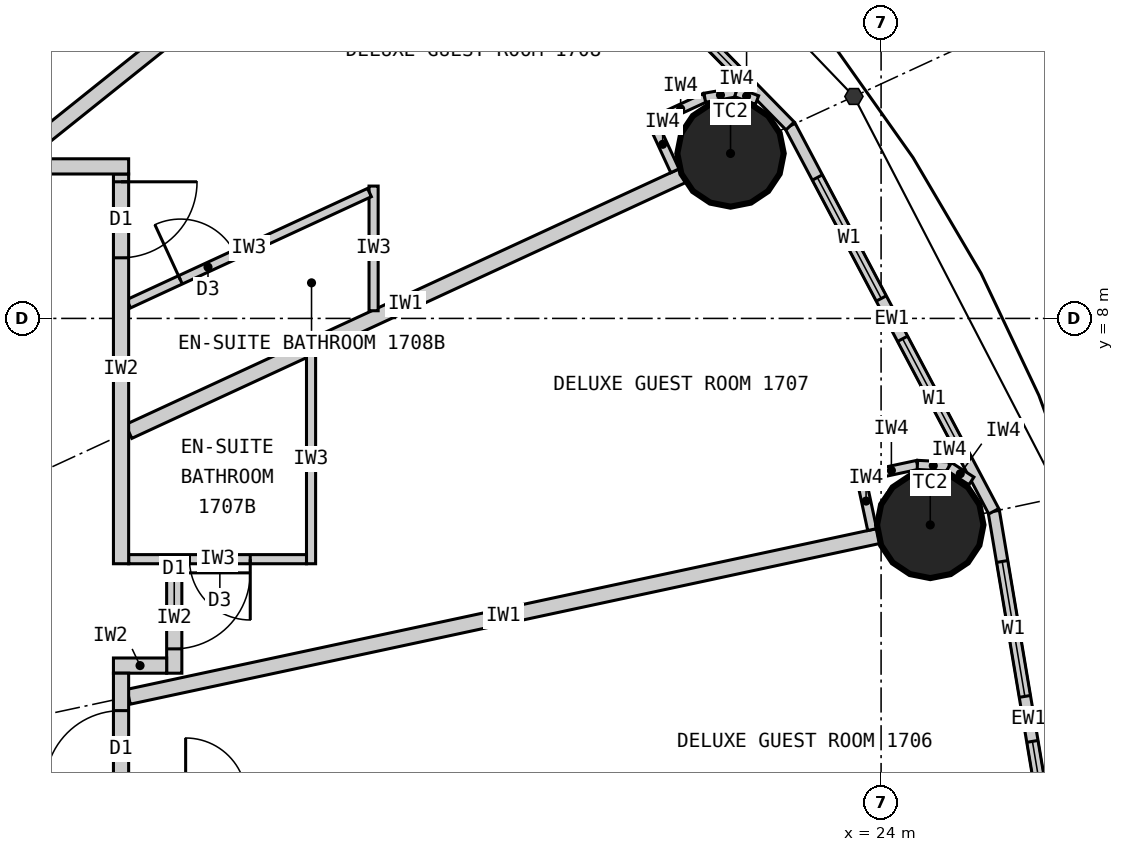
"""IFC4 building model, lengths in metres.
Left out: names, types, materials, properties, quantities, classifications, styles, units other than length and angle.
Written with IfcOpenShell. Run it as: python <this file> out.ifc"""

import sys

from ifc_helpers import new_model, si_unit, direction, frame, frame_2d, origin, origin_2d, place, context, subcontext, project, spatial, rectangle, circle, extrude, element, fill, save


model = new_model("IFC4")
c1 = context("Model", 3, precision=1e-05, world=origin(), true_north=direction((0.0, 1.0)))
c2 = subcontext(c1, "Body", "Model", "MODEL_VIEW")
j1 = project(units=[si_unit("LENGTHUNIT", "METRE"), si_unit("PLANEANGLEUNIT", "RADIAN")], contexts=[c1])
p1 = place(None, origin())
s1 = spatial("IfcSite", under=j1, at=p1, CompositionType="ELEMENT")
p2 = place(p1, origin())
s2 = spatial("IfcBuilding", under=s1, at=p2, CompositionType="ELEMENT")
p3 = place(p2, frame((0.0, 0.0, 70.5)))
s3 = spatial("IfcBuildingStorey", under=s2, at=p3, CompositionType="ELEMENT", Elevation=70.5)
for number, where, z_axis, x_axis in (
    (1, (24.647, 5.283, 0.0), (0.0, 0.0, 1.0), (1.0, 0.0, 0.0)),
    (2, (22.019, 10.17, 0.0), (0.0, 0.0, 1.0), (1.0, 0.0, 0.0)),
):
    element("IfcColumn", number, at=place(p3, frame(where, z_axis=z_axis, x_axis=x_axis)), inside=s3, PredefinedType="COLUMN", context=c2, shape_type="SweptSolid", body=[
        extrude(circle(Radius=0.7, at=origin_2d()), origin(), (0.0, 0.0, 1.0), 3.3),
    ])
p4 = place(p3, frame((26.4, 0.0, 0.0), z_axis=(0.0, 0.0, 1.0), x_axis=(-0.165642551694, 0.986185857264, 0.0)))
e3 = element("IfcWall", 3, at=p4, inside=s3, PredefinedType="ELEMENTEDWALL", context=c2, shape_type="SweptSolid", body=[
    extrude(rectangle(XDim=5.539, YDim=0.15, at=frame_2d((2.77, 0.0))), origin(), (0.0, 0.0, 1.0), 3.12),
])
p5 = place(p4, frame((0.669, 0.0, 0.9)))
e4 = element("IfcOpeningElement", 4, at=p5, cuts=e3, PredefinedType="OPENING", context=c2, shape_type="SweptSolid", body=[
    extrude(rectangle(XDim=1.8, YDim=1.9, at=frame_2d((0.9, 0.95))), frame((0.0, 0.085, 0.0), z_axis=(0.0, -1.0, 0.0), x_axis=(1.0, 0.0, 0.0)), (0.0, 0.0, 1.0), 0.17),
])
p6 = place(p4, frame((3.07, 0.0, 0.9)))
e5 = element("IfcOpeningElement", 5, at=p6, cuts=e3, PredefinedType="OPENING", context=c2, shape_type="SweptSolid", body=[
    extrude(rectangle(XDim=1.8, YDim=1.9, at=frame_2d((0.9, 0.95))), frame((0.0, 0.085, 0.0), z_axis=(0.0, -1.0, 0.0), x_axis=(1.0, 0.0, 0.0)), (0.0, 0.0, 1.0), 0.17),
])
p7 = place(p3, frame((25.482, 5.462, 0.0), z_axis=(0.0, 0.0, 1.0), x_axis=(-0.467296867008, 0.884100468321, 0.0)))
e6 = element("IfcWall", 6, at=p7, inside=s3, PredefinedType="ELEMENTEDWALL", context=c2, shape_type="SweptSolid", body=[
    extrude(rectangle(XDim=5.734, YDim=0.15, at=frame_2d((2.867, 0.0))), origin(), (0.0, 0.0, 1.0), 3.12),
])
p8 = place(p7, frame((0.767, 0.0, 0.9)))
e7 = element("IfcOpeningElement", 7, at=p8, cuts=e6, PredefinedType="OPENING", context=c2, shape_type="SweptSolid", body=[
    extrude(rectangle(XDim=1.8, YDim=1.9, at=frame_2d((0.9, 0.95))), frame((0.0, 0.085, 0.0), z_axis=(0.0, -1.0, 0.0), x_axis=(1.0, 0.0, 0.0)), (0.0, 0.0, 1.0), 0.17),
])
p9 = place(p7, frame((3.167, 0.0, 0.9)))
e8 = element("IfcOpeningElement", 8, at=p9, cuts=e6, PredefinedType="OPENING", context=c2, shape_type="SweptSolid", body=[
    extrude(rectangle(XDim=1.8, YDim=1.9, at=frame_2d((0.9, 0.95))), frame((0.0, 0.085, 0.0), z_axis=(0.0, -1.0, 0.0), x_axis=(1.0, 0.0, 0.0)), (0.0, 0.0, 1.0), 0.17),
])
p10 = place(p3, frame((22.803, 10.532, 0.0), z_axis=(0.0, 0.0, 1.0), x_axis=(-0.699602905915, 0.714531856557, 0.0)))
e9 = element("IfcWall", 9, at=p10, inside=s3, PredefinedType="ELEMENTEDWALL", context=c2, shape_type="SweptSolid", body=[
    extrude(rectangle(XDim=6.051, YDim=0.15, at=frame_2d((3.025, 0.0))), origin(), (0.0, 0.0, 1.0), 3.12),
])
p11 = place(p10, frame((0.926, 0.0, 0.9)))
e10 = element("IfcOpeningElement", 10, at=p11, cuts=e9, PredefinedType="OPENING", context=c2, shape_type="SweptSolid", body=[
    extrude(rectangle(XDim=1.8, YDim=1.9, at=frame_2d((0.9, 0.95))), frame((0.0, 0.085, 0.0), z_axis=(0.0, -1.0, 0.0), x_axis=(1.0, 0.0, 0.0)), (0.0, 0.0, 1.0), 0.17),
])
p12 = place(p10, frame((3.325, 0.0, 0.9)))
e11 = element("IfcOpeningElement", 11, at=p12, cuts=e9, PredefinedType="OPENING", context=c2, shape_type="SweptSolid", body=[
    extrude(rectangle(XDim=1.8, YDim=1.9, at=frame_2d((0.9, 0.95))), frame((0.0, 0.085, 0.0), z_axis=(0.0, -1.0, 0.0), x_axis=(1.0, 0.0, 0.0)), (0.0, 0.0, 1.0), 0.17),
])
p13 = place(p3, frame((14.1, 3.022, 0.0), z_axis=(0.0, 0.0, 1.0), x_axis=(0.977790014929, 0.209586943072, 0.0)))
e12 = element("IfcWall", 12, at=p13, inside=s3, PredefinedType="PARTITIONING", context=c2, shape_type="SweptSolid", body=[
    extrude(rectangle(XDim=10.087, YDim=0.2, at=frame_2d((5.043, 0.0))), origin(), (0.0, 0.0, 1.0), 2.32),
])
p14 = place(p3, frame((14.1, 6.512, 0.0), z_axis=(0.0, 0.0, 1.0), x_axis=(0.907832871056, 0.419332181247, 0.0)))
e13 = element("IfcWall", 13, at=p14, inside=s3, PredefinedType="PARTITIONING", context=c2, shape_type="SweptSolid", body=[
    extrude(rectangle(XDim=8.023, YDim=0.2, at=frame_2d((4.011, 0.0))), origin(), (0.0, 0.0, 1.0), 2.32),
])
p15 = place(p3, frame((12.625, 10.1, 0.0), z_axis=(0.0, 0.0, 1.0), x_axis=(0.780892451574, 0.624665493744, 0.0)))
e14 = element("IfcWall", 14, at=p15, inside=s3, PredefinedType="PARTITIONING", context=c2, shape_type="SweptSolid", body=[
    extrude(rectangle(XDim=6.045, YDim=0.2, at=frame_2d((3.022, 0.0))), origin(), (0.0, 0.0, 1.0), 2.32),
])
p16 = place(p3, frame((16.5, 7.521, 0.0), z_axis=(0.0, 0.0, 1.0), x_axis=(0.0, -1.0, 0.0)))
e15 = element("IfcWall", 15, at=p16, inside=s3, PredefinedType="PARTITIONING", context=c2, shape_type="SweptSolid", body=[
    extrude(rectangle(XDim=2.749, YDim=0.12, at=frame_2d((1.374, 0.0))), origin(), (0.0, 0.0, 1.0), 3.12),
])
p17 = place(p3, frame((14.1, 4.833, 0.0), z_axis=(0.0, 0.0, 1.0), x_axis=(1.0, 0.0, 0.0)))
e16 = element("IfcWall", 16, at=p17, inside=s3, PredefinedType="PARTITIONING", context=c2, shape_type="SweptSolid", body=[
    extrude(rectangle(XDim=2.34, YDim=0.12, at=frame_2d((1.17, 0.0))), origin(), (0.0, 0.0, 1.0), 3.12),
])
p18 = place(p17, frame((0.8, 0.0, 0.0)))
e17 = element("IfcOpeningElement", 17, at=p18, cuts=e16, PredefinedType="OPENING", context=c2, shape_type="SweptSolid", body=[
    extrude(rectangle(XDim=0.8, YDim=2.1, at=frame_2d((0.4, 1.05))), frame((0.0, 0.07, 0.0), z_axis=(0.0, -1.0, 0.0), x_axis=(1.0, 0.0, 0.0)), (0.0, 0.0, 1.0), 0.14),
])
p19 = place(p3, frame((17.323, 8.101, 0.0), z_axis=(0.0, 0.0, 1.0), x_axis=(0.0, 1.0, 0.0)))
e18 = element("IfcWall", 18, at=p19, inside=s3, PredefinedType="PARTITIONING", context=c2, shape_type="SweptSolid", body=[
    extrude(rectangle(XDim=1.64, YDim=0.12, at=frame_2d((0.82, 0.0))), origin(), (0.0, 0.0, 1.0), 3.12),
])
p20 = place(p3, frame((14.1, 8.193, 0.0), z_axis=(0.0, 0.0, 1.0), x_axis=(0.907836493557, 0.419324338628, 0.0)))
e19 = element("IfcWall", 19, at=p20, inside=s3, PredefinedType="PARTITIONING", context=c2, shape_type="SweptSolid", body=[
    extrude(rectangle(XDim=3.49, YDim=0.12, at=frame_2d((1.745, 0.0))), origin(), (0.0, 0.0, 1.0), 3.12),
])
p21 = place(p20, frame((0.75, 0.0, 0.0)))
e20 = element("IfcOpeningElement", 20, at=p21, cuts=e19, PredefinedType="OPENING", context=c2, shape_type="SweptSolid", body=[
    extrude(rectangle(XDim=0.8, YDim=2.1, at=frame_2d((0.4, 1.05))), frame((0.0, 0.07, 0.0), z_axis=(0.0, -1.0, 0.0), x_axis=(1.0, 0.0, 0.0)), (0.0, 0.0, 1.0), 0.14),
])
p22 = place(p3, frame((14.7, 3.333, 0.0), z_axis=(0.0, 0.0, 1.0), x_axis=(0.0, 1.0, 0.0)))
e21 = element("IfcWall", 21, at=p22, inside=s3, PredefinedType="PARTITIONING", context=c2, shape_type="SweptSolid", body=[
    extrude(rectangle(XDim=1.44, YDim=0.2, at=frame_2d((0.72, 0.0))), origin(), (0.0, 0.0, 1.0), 3.12),
])
p23 = place(p22, frame((0.32, 0.0, 0.0)))
e22 = element("IfcOpeningElement", 22, at=p23, cuts=e21, PredefinedType="OPENING", context=c2, shape_type="SweptSolid", body=[
    extrude(rectangle(XDim=1.0, YDim=2.2, at=frame_2d((0.5, 1.1))), frame((0.0, 0.11, 0.0), z_axis=(0.0, -1.0, 0.0), x_axis=(1.0, 0.0, 0.0)), (0.0, 0.0, 1.0), 0.22),
])
p24 = place(p3, frame((13.9, 3.433, 0.0), z_axis=(0.0, 0.0, 1.0), x_axis=(1.0, 0.0, 0.0)))
e23 = element("IfcWall", 23, at=p24, inside=s3, PredefinedType="PARTITIONING", context=c2, shape_type="SweptSolid", body=[
    extrude(rectangle(XDim=0.7, YDim=0.2, at=frame_2d((0.35, 0.0))), origin(), (0.0, 0.0, 1.0), 2.32),
])
p25 = place(p3, frame((14.0, -9.9, 0.0), z_axis=(0.0, 0.0, 1.0), x_axis=(0.0, 1.0, 0.0)))
e24 = element("IfcWall", 24, at=p25, inside=s3, PredefinedType="PARTITIONING", context=c2, shape_type="SweptSolid", body=[
    extrude(rectangle(XDim=13.232, YDim=0.2, at=frame_2d((6.616, 0.0))), origin(), (0.0, 0.0, 1.0), 3.12),
])
p26 = place(p25, frame((4.948, 0.0, 0.0)))
e25 = element("IfcOpeningElement", 25, at=p26, cuts=e24, PredefinedType="OPENING", context=c2, shape_type="SweptSolid", body=[
    extrude(rectangle(XDim=1.0, YDim=2.2, at=frame_2d((0.5, 1.1))), frame((0.0, 0.11, 0.0), z_axis=(0.0, -1.0, 0.0), x_axis=(1.0, 0.0, 0.0)), (0.0, 0.0, 1.0), 0.22),
])
p27 = place(p25, frame((8.718, 0.0, 0.0)))
e26 = element("IfcOpeningElement", 26, at=p27, cuts=e24, PredefinedType="OPENING", context=c2, shape_type="SweptSolid", body=[
    extrude(rectangle(XDim=1.0, YDim=2.2, at=frame_2d((0.5, 1.1))), frame((0.0, 0.11, 0.0), z_axis=(0.0, -1.0, 0.0), x_axis=(1.0, 0.0, 0.0)), (0.0, 0.0, 1.0), 0.22),
])
p28 = place(p25, frame((11.74, 0.0, 0.0)))
e27 = element("IfcOpeningElement", 27, at=p28, cuts=e24, PredefinedType="OPENING", context=c2, shape_type="SweptSolid", body=[
    extrude(rectangle(XDim=1.0, YDim=2.2, at=frame_2d((0.5, 1.1))), frame((0.0, 0.11, 0.0), z_axis=(0.0, -1.0, 0.0), x_axis=(1.0, 0.0, 0.0)), (0.0, 0.0, 1.0), 0.22),
])
p29 = place(p3, frame((14.0, 4.772, 0.0), z_axis=(0.0, 0.0, 1.0), x_axis=(0.0, 1.0, 0.0)))
e28 = element("IfcWall", 28, at=p29, inside=s3, PredefinedType="PARTITIONING", context=c2, shape_type="SweptSolid", body=[
    extrude(rectangle(XDim=5.127, YDim=0.2, at=frame_2d((2.564, 0.0))), origin(), (0.0, 0.0, 1.0), 3.12),
])
p30 = place(p29, frame((4.025, 0.0, 0.0)))
e29 = element("IfcOpeningElement", 29, at=p30, cuts=e28, PredefinedType="OPENING", context=c2, shape_type="SweptSolid", body=[
    extrude(rectangle(XDim=1.0, YDim=2.2, at=frame_2d((0.5, 1.1))), frame((0.0, 0.11, 0.0), z_axis=(0.0, -1.0, 0.0), x_axis=(1.0, 0.0, 0.0)), (0.0, 0.0, 1.0), 0.22),
])
p31 = place(p3, frame((10.885, 10.0, 0.0), z_axis=(0.0, 0.0, 1.0), x_axis=(1.0, 0.0, 0.0)))
e30 = element("IfcWall", 30, at=p31, inside=s3, PredefinedType="PARTITIONING", context=c2, shape_type="SweptSolid", body=[
    extrude(rectangle(XDim=3.215, YDim=0.2, at=frame_2d((1.607, 0.0))), origin(), (0.0, 0.0, 1.0), 3.12),
])
p32 = place(p3, frame((23.883, 5.222, 0.0), z_axis=(0.0, 0.0, 1.0), x_axis=(-0.209311842415, 0.977848941619, 0.0)))
e31 = element("IfcWall", 31, at=p32, inside=s3, PredefinedType="PARTITIONING", context=c2, shape_type="SweptSolid", body=[
    extrude(rectangle(XDim=0.768, YDim=0.12, at=frame_2d((0.384, 0.0))), origin(), (0.0, 0.0, 1.0), 3.12),
])
p33 = place(p3, frame((23.793, 5.926, 0.0), z_axis=(0.0, 0.0, 1.0), x_axis=(0.977792206673, 0.209576717621, 0.0)))
e32 = element("IfcWall", 32, at=p33, inside=s3, PredefinedType="PARTITIONING", context=c2, shape_type="SweptSolid", body=[
    extrude(rectangle(XDim=0.7, YDim=0.12, at=frame_2d((0.35, 0.0))), origin(), (0.0, 0.0, 1.0), 3.12),
])
p34 = place(p3, frame((24.478, 6.073, 0.0), z_axis=(0.0, 0.0, 1.0), x_axis=(0.998708262812, -0.05081147302, 0.0)))
e33 = element("IfcWall", 33, at=p34, inside=s3, PredefinedType="PARTITIONING", context=c2, shape_type="SweptSolid", body=[
    extrude(rectangle(XDim=0.418, YDim=0.12, at=frame_2d((0.209, 0.0))), origin(), (0.0, 0.0, 1.0), 3.12),
])
p35 = place(p3, frame((24.895, 6.052, 0.0), z_axis=(0.0, 0.0, 1.0), x_axis=(0.839495197275, -0.54336710772, 0.0)))
e34 = element("IfcWall", 34, at=p35, inside=s3, PredefinedType="PARTITIONING", context=c2, shape_type="SweptSolid", body=[
    extrude(rectangle(XDim=0.35, YDim=0.12, at=frame_2d((0.175, 0.0))), origin(), (0.0, 0.0, 1.0), 3.12),
])
p36 = place(p3, frame((21.287, 9.942, 0.0), z_axis=(0.0, 0.0, 1.0), x_axis=(-0.419259891039, 0.907866258744, 0.0)))
e35 = element("IfcWall", 35, at=p36, inside=s3, PredefinedType="PARTITIONING", context=c2, shape_type="SweptSolid", body=[
    extrude(rectangle(XDim=0.768, YDim=0.12, at=frame_2d((0.384, 0.0))), origin(), (0.0, 0.0, 1.0), 3.12),
])
p37 = place(p3, frame((21.045, 10.61, 0.0), z_axis=(0.0, 0.0, 1.0), x_axis=(0.907877701396, 0.419235112208, 0.0)))
e36 = element("IfcWall", 36, at=p37, inside=s3, PredefinedType="PARTITIONING", context=c2, shape_type="SweptSolid", body=[
    extrude(rectangle(XDim=0.7, YDim=0.12, at=frame_2d((0.35, 0.0))), origin(), (0.0, 0.0, 1.0), 3.12),
])
p38 = place(p3, frame((21.68, 10.903, 0.0), z_axis=(0.0, 0.0, 1.0), x_axis=(0.985446622073, 0.169985161247, 0.0)))
e37 = element("IfcWall", 37, at=p38, inside=s3, PredefinedType="PARTITIONING", context=c2, shape_type="SweptSolid", body=[
    extrude(rectangle(XDim=0.418, YDim=0.12, at=frame_2d((0.209, 0.0))), origin(), (0.0, 0.0, 1.0), 3.12),
])
p39 = place(p3, frame((22.092, 10.974, 0.0), z_axis=(0.0, 0.0, 1.0), x_axis=(0.938428160676, -0.345474437912, 0.0)))
e38 = element("IfcWall", 38, at=p39, inside=s3, PredefinedType="PARTITIONING", context=c2, shape_type="SweptSolid", body=[
    extrude(rectangle(XDim=0.294, YDim=0.12, at=frame_2d((0.147, 0.0))), origin(), (0.0, 0.0, 1.0), 3.12),
])
p40 = place(p5, origin())
e39 = element("IfcWindow", 39, at=p40, inside=s3, PartitioningType="SINGLE_PANEL", PredefinedType="WINDOW", context=c2, shape_type="SweptSolid", body=[
    extrude(rectangle(XDim=1.8, YDim=1.9, at=frame_2d((0.9, 0.95))), frame((0.0, 0.03, 0.0), z_axis=(0.0, -1.0, 0.0), x_axis=(1.0, 0.0, 0.0)), (0.0, 0.0, 1.0), 0.06),
])
fill(e4, e39)
p41 = place(p6, origin())
e40 = element("IfcWindow", 40, at=p41, inside=s3, PartitioningType="SINGLE_PANEL", PredefinedType="WINDOW", context=c2, shape_type="SweptSolid", body=[
    extrude(rectangle(XDim=1.8, YDim=1.9, at=frame_2d((0.9, 0.95))), frame((0.0, 0.03, 0.0), z_axis=(0.0, -1.0, 0.0), x_axis=(1.0, 0.0, 0.0)), (0.0, 0.0, 1.0), 0.06),
])
fill(e5, e40)
p42 = place(p8, origin())
e41 = element("IfcWindow", 41, at=p42, inside=s3, PartitioningType="SINGLE_PANEL", PredefinedType="WINDOW", context=c2, shape_type="SweptSolid", body=[
    extrude(rectangle(XDim=1.8, YDim=1.9, at=frame_2d((0.9, 0.95))), frame((0.0, 0.03, 0.0), z_axis=(0.0, -1.0, 0.0), x_axis=(1.0, 0.0, 0.0)), (0.0, 0.0, 1.0), 0.06),
])
fill(e7, e41)
p43 = place(p9, origin())
e42 = element("IfcWindow", 42, at=p43, inside=s3, PartitioningType="SINGLE_PANEL", PredefinedType="WINDOW", context=c2, shape_type="SweptSolid", body=[
    extrude(rectangle(XDim=1.8, YDim=1.9, at=frame_2d((0.9, 0.95))), frame((0.0, 0.03, 0.0), z_axis=(0.0, -1.0, 0.0), x_axis=(1.0, 0.0, 0.0)), (0.0, 0.0, 1.0), 0.06),
])
fill(e8, e42)
p44 = place(p11, origin())
e43 = element("IfcWindow", 43, at=p44, inside=s3, PartitioningType="SINGLE_PANEL", PredefinedType="WINDOW", context=c2, shape_type="SweptSolid", body=[
    extrude(rectangle(XDim=1.8, YDim=1.9, at=frame_2d((0.9, 0.95))), frame((0.0, 0.03, 0.0), z_axis=(0.0, -1.0, 0.0), x_axis=(1.0, 0.0, 0.0)), (0.0, 0.0, 1.0), 0.06),
])
fill(e10, e43)
p45 = place(p28, origin())
e44 = element("IfcDoor", 44, at=p45, inside=s3, OperationType="SINGLE_SWING_LEFT", PredefinedType="DOOR", context=c2, shape_type="SweptSolid", body=[
    extrude(rectangle(XDim=1.0, YDim=2.2, at=frame_2d((0.5, 1.1))), frame((0.0, 0.025, 0.0), z_axis=(0.0, -1.0, 0.0), x_axis=(1.0, 0.0, 0.0)), (0.0, 0.0, 1.0), 0.05),
])
fill(e27, e44)
p46 = place(p18, origin())
e45 = element("IfcDoor", 45, at=p46, inside=s3, OperationType="SINGLE_SWING_RIGHT", PredefinedType="DOOR", context=c2, shape_type="SweptSolid", body=[
    extrude(rectangle(XDim=0.8, YDim=2.1, at=frame_2d((0.4, 1.05))), frame((0.0, 0.025, 0.0), z_axis=(0.0, -1.0, 0.0), x_axis=(1.0, 0.0, 0.0)), (0.0, 0.0, 1.0), 0.05),
])
fill(e17, e45)
p47 = place(p23, origin())
e46 = element("IfcDoor", 46, at=p47, inside=s3, OperationType="SINGLE_SWING_RIGHT", PredefinedType="DOOR", context=c2, shape_type="SweptSolid", body=[
    extrude(rectangle(XDim=1.0, YDim=2.2, at=frame_2d((0.5, 1.1))), frame((0.0, 0.025, 0.0), z_axis=(0.0, -1.0, 0.0), x_axis=(1.0, 0.0, 0.0)), (0.0, 0.0, 1.0), 0.05),
])
fill(e22, e46)
p48 = place(p21, origin())
e47 = element("IfcDoor", 47, at=p48, inside=s3, OperationType="SINGLE_SWING_LEFT", PredefinedType="DOOR", context=c2, shape_type="SweptSolid", body=[
    extrude(rectangle(XDim=0.8, YDim=2.1, at=frame_2d((0.4, 1.05))), frame((0.0, 0.025, 0.0), z_axis=(0.0, -1.0, 0.0), x_axis=(1.0, 0.0, 0.0)), (0.0, 0.0, 1.0), 0.05),
])
fill(e20, e47)
p49 = place(p30, origin())
e48 = element("IfcDoor", 48, at=p49, inside=s3, OperationType="SINGLE_SWING_RIGHT", PredefinedType="DOOR", context=c2, shape_type="SweptSolid", body=[
    extrude(rectangle(XDim=1.0, YDim=2.2, at=frame_2d((0.5, 1.1))), frame((0.0, 0.025, 0.0), z_axis=(0.0, -1.0, 0.0), x_axis=(1.0, 0.0, 0.0)), (0.0, 0.0, 1.0), 0.05),
])
fill(e29, e48)
save(model, sys.argv[1])
